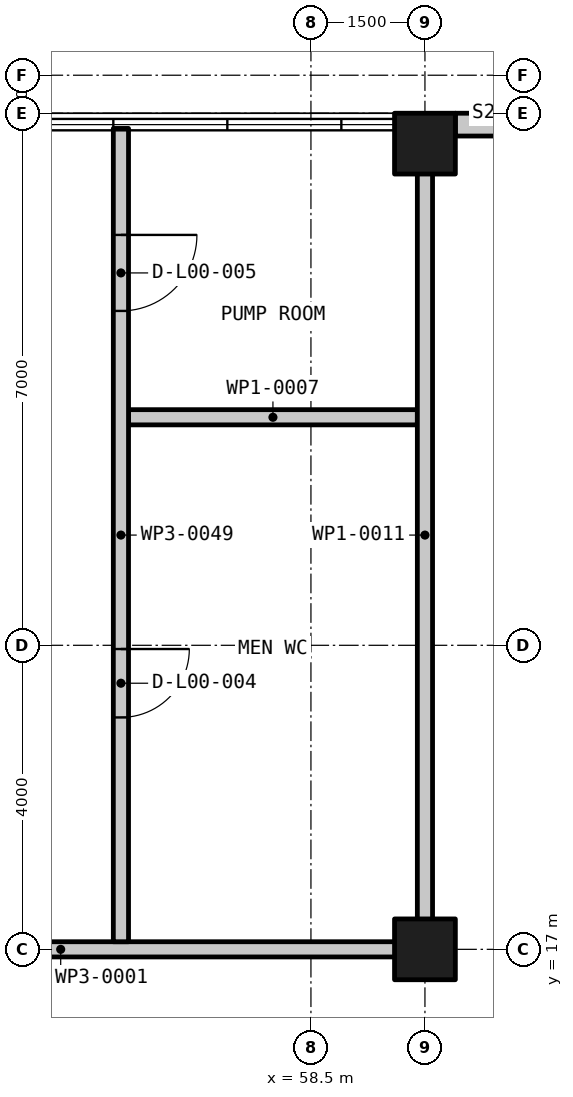
"""IFC4 building model, lengths in metres.
Left out: names, types, materials, properties, quantities, classifications, styles, units other than length and angle.
Written with IfcOpenShell. Run it as: python <this file> out.ifc"""

import sys

from ifc_helpers import new_model, si_unit, direction, frame, frame_2d, origin, origin_2d, place, context, subcontext, project, spatial, rectangle, extrude, element, fill, save


model = new_model("IFC4")
c1 = context("Model", 3, precision=1e-05, world=origin(), true_north=direction((0.0, 1.0)))
c2 = subcontext(c1, "Body", "Model", "MODEL_VIEW")
j1 = project(units=[si_unit("LENGTHUNIT", "METRE"), si_unit("PLANEANGLEUNIT", "RADIAN")], contexts=[c1])
p1 = place(None, origin())
s1 = spatial("IfcSite", under=j1, at=p1, CompositionType="ELEMENT")
p2 = place(p1, origin())
s2 = spatial("IfcBuilding", under=s1, at=p2, CompositionType="ELEMENT")
p3 = place(p2, origin())
s3 = spatial("IfcBuildingStorey", under=s2, at=p3, CompositionType="ELEMENT", Elevation=0.0)
for number, where, z_axis, x_axis in (
    (1, (60.0, 17.0, -0.2), (0.0, 0.0, 1.0), (1.0, 0.0, 0.0)),
    (2, (60.0, 27.6, -0.2), (0.0, 0.0, 1.0), (1.0, 0.0, 0.0)),
):
    element("IfcColumn", number, at=place(p3, frame(where, z_axis=z_axis, x_axis=x_axis)), inside=s3, PredefinedType="COLUMN", context=c2, shape_type="SweptSolid", body=[
        extrude(rectangle(XDim=0.8, YDim=0.8, at=origin_2d()), origin(), (0.0, 0.0, 1.0), 5.9),
    ])
p4 = place(p3, frame((60.4, 27.85, 0.0), z_axis=(0.0, 0.0, 1.0), x_axis=(1.0, 0.0, 0.0)))
e3 = element("IfcWall", 3, at=p4, inside=s3, PredefinedType="SOLIDWALL", context=c2, shape_type="SweptSolid", body=[
    extrude(rectangle(XDim=10.8, YDim=0.3, at=frame_2d((5.4, 0.0))), origin(), (0.0, 0.0, 1.0), 4.8),
])
p5 = place(p3, frame((23.9, 17.0, 0.0), z_axis=(0.0, 0.0, 1.0), x_axis=(1.0, 0.0, 0.0)))
e4 = element("IfcWall", 4, at=p5, inside=s3, PredefinedType="PARTITIONING", context=c2, shape_type="SweptSolid", body=[
    extrude(rectangle(XDim=36.2, YDim=0.2, at=frame_2d((18.1, 0.0))), origin(), (0.0, 0.0, 1.0), 4.8),
])
p6 = place(p5, frame((2.599, 0.0, 0.0)))
e5 = element("IfcOpeningElement", 5, at=p6, cuts=e4, PredefinedType="OPENING", context=c2, shape_type="SweptSolid", body=[
    extrude(rectangle(XDim=2.0, YDim=2.1, at=frame_2d((1.0, 1.05))), frame((0.0, 0.11, 0.0), z_axis=(0.0, -1.0, 0.0), x_axis=(1.0, 0.0, 0.0)), (0.0, 0.0, 1.0), 0.22),
])
p7 = place(p5, frame((29.35, 0.0, 0.0)))
e6 = element("IfcOpeningElement", 6, at=p7, cuts=e4, PredefinedType="OPENING", context=c2, shape_type="SweptSolid", body=[
    extrude(rectangle(XDim=1.5, YDim=2.1, at=frame_2d((0.75, 1.05))), frame((0.0, 0.11, 0.0), z_axis=(0.0, -1.0, 0.0), x_axis=(1.0, 0.0, 0.0)), (0.0, 0.0, 1.0), 0.22),
])
p8 = place(p3, frame((56.1, 24.0, 0.0), z_axis=(0.0, 0.0, 1.0), x_axis=(1.0, 0.0, 0.0)))
e7 = element("IfcWall", 7, at=p8, inside=s3, PredefinedType="PARTITIONING", context=c2, shape_type="SweptSolid", body=[
    extrude(rectangle(XDim=3.8, YDim=0.2, at=frame_2d((1.9, 0.0))), origin(), (0.0, 0.0, 1.0), 4.8),
])
p9 = place(p3, frame((60.0, 17.1, 0.0), z_axis=(0.0, 0.0, 1.0), x_axis=(0.0, 1.0, 0.0)))
e8 = element("IfcWall", 8, at=p9, inside=s3, PredefinedType="PARTITIONING", context=c2, shape_type="SweptSolid", body=[
    extrude(rectangle(XDim=10.7, YDim=0.2, at=frame_2d((5.35, 0.0))), origin(), (0.0, 0.0, 1.0), 4.8),
])
p10 = place(p3, frame((56.0, 27.8, 0.0), z_axis=(0.0, 0.0, 1.0), x_axis=(0.0, -1.0, 0.0)))
e9 = element("IfcWall", 9, at=p10, inside=s3, PredefinedType="PARTITIONING", context=c2, shape_type="SweptSolid", body=[
    extrude(rectangle(XDim=10.7, YDim=0.2, at=frame_2d((5.35, 0.0))), origin(), (0.0, 0.0, 1.0), 4.8),
])
p11 = place(p10, frame((6.849, 0.0, 0.0)))
e10 = element("IfcOpeningElement", 10, at=p11, cuts=e9, PredefinedType="OPENING", context=c2, shape_type="SweptSolid", body=[
    extrude(rectangle(XDim=0.9, YDim=2.1, at=frame_2d((0.45, 1.05))), frame((0.0, 0.11, 0.0), z_axis=(0.0, -1.0, 0.0), x_axis=(1.0, 0.0, 0.0)), (0.0, 0.0, 1.0), 0.22),
])
p12 = place(p10, frame((1.401, 0.0, 0.0)))
e11 = element("IfcOpeningElement", 11, at=p12, cuts=e9, PredefinedType="OPENING", context=c2, shape_type="SweptSolid", body=[
    extrude(rectangle(XDim=1.0, YDim=2.1, at=frame_2d((0.5, 1.05))), frame((0.0, 0.11, 0.0), z_axis=(0.0, -1.0, 0.0), x_axis=(1.0, 0.0, 0.0)), (0.0, 0.0, 1.0), 0.22),
])
p13 = place(p11, origin())
e12 = element("IfcDoor", 12, at=p13, inside=s3, OperationType="SINGLE_SWING_LEFT", PredefinedType="DOOR", context=c2, shape_type="SweptSolid", body=[
    extrude(rectangle(XDim=0.9, YDim=2.1, at=frame_2d((0.45, 1.05))), frame((0.0, 0.025, 0.0), z_axis=(0.0, -1.0, 0.0), x_axis=(1.0, 0.0, 0.0)), (0.0, 0.0, 1.0), 0.05),
])
fill(e10, e12)
p14 = place(p12, origin())
e13 = element("IfcDoor", 13, at=p14, inside=s3, OperationType="SINGLE_SWING_RIGHT", PredefinedType="DOOR", context=c2, shape_type="SweptSolid", body=[
    extrude(rectangle(XDim=1.0, YDim=2.1, at=frame_2d((0.5, 1.05))), frame((0.0, 0.025, 0.0), z_axis=(0.0, -1.0, 0.0), x_axis=(1.0, 0.0, 0.0)), (0.0, 0.0, 1.0), 0.05),
])
fill(e11, e13)
save(model, sys.argv[1])
